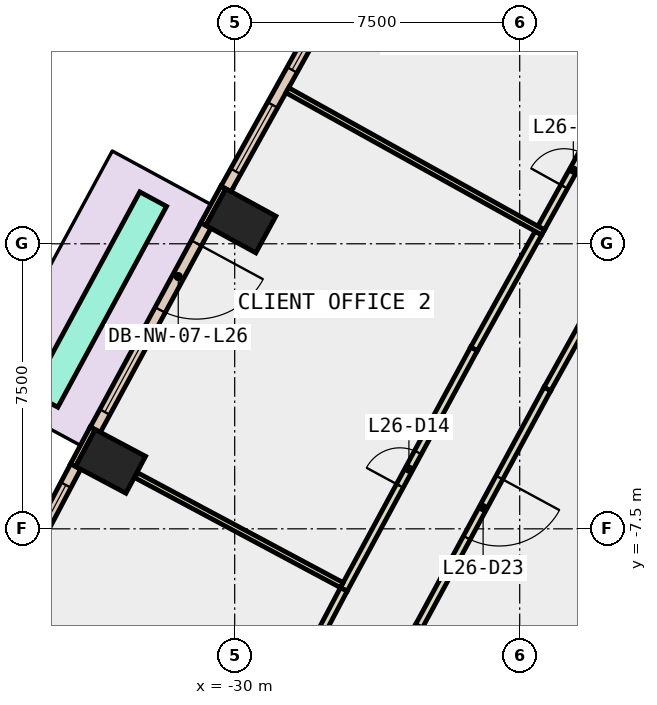
"""IFC4 building model, lengths in metres.
Left out: names, types, materials, properties, quantities, classifications, styles, units other than length and angle.
Written with IfcOpenShell. Run it as: python <this file> out.ifc"""

import sys

from ifc_helpers import new_model, si_unit, direction, frame, frame_2d, origin, origin_2d, place, context, subcontext, project, spatial, rectangle, extrude, element, fill, save


model = new_model("IFC4")
c1 = context("Model", 3, precision=1e-05, world=origin(), true_north=direction((0.0, 1.0)))
c2 = subcontext(c1, "Body", "Model", "MODEL_VIEW")
j1 = project(units=[si_unit("LENGTHUNIT", "METRE"), si_unit("PLANEANGLEUNIT", "RADIAN")], contexts=[c1])
p1 = place(None, origin())
s1 = spatial("IfcSite", under=j1, at=p1, CompositionType="ELEMENT")
p2 = place(p1, origin())
s2 = spatial("IfcBuilding", under=s1, at=p2, CompositionType="ELEMENT")
p3 = place(p2, frame((0.0, 0.0, 120.2)))
s3 = spatial("IfcBuildingStorey", under=s2, at=p3, CompositionType="ELEMENT", Elevation=120.2)
for number, where, z_axis, x_axis in (
    (1, (-29.838, 0.604, -0.4), (0.0, 0.0, 1.0), (0.48, 0.877, 0.0)),
    (2, (-33.266, -5.726, -0.4), (0.0, 0.0, 1.0), (0.469, 0.883, 0.0)),
):
    element("IfcColumn", number, at=place(p3, frame(where, z_axis=z_axis, x_axis=x_axis)), inside=s3, PredefinedType="COLUMN", context=c2, shape_type="SweptSolid", body=[
        extrude(rectangle(XDim=1.1, YDim=1.5, at=origin_2d()), origin(), (0.0, 0.0, 1.0), 4.2),
    ])
p4 = place(p3, frame((-30.298, 1.483, 0.0), z_axis=(0.0, 0.0, 1.0), x_axis=(-0.479566870346, -0.877505337229, 0.0)))
e3 = element("IfcWall", 3, at=p4, inside=s3, PredefinedType="STANDARD", context=c2, shape_type="SweptSolid", body=[
    extrude(rectangle(XDim=1.101, YDim=0.15, at=frame_2d((0.55, 0.0))), origin(), (0.0, 0.0, 1.0), 3.8),
])
p5 = place(p3, frame((-33.737, -4.854, 0.0), z_axis=(0.0, 0.0, 1.0), x_axis=(-0.46919310775, -0.883095593716, 0.0)))
e4 = element("IfcWall", 4, at=p5, inside=s3, PredefinedType="STANDARD", context=c2, shape_type="SweptSolid", body=[
    extrude(rectangle(XDim=1.099, YDim=0.15, at=frame_2d((0.55, 0.0))), origin(), (0.0, 0.0, 1.0), 3.8),
])
p6 = place(p3, frame((-27.262, 6.784, 0.0), z_axis=(0.0, 0.0, 1.0), x_axis=(-0.485822751649, -0.874057351654, 0.0)))
e5 = element("IfcWall", 5, at=p6, inside=s3, PredefinedType="STANDARD", context=c2, shape_type="SweptSolid", body=[
    extrude(rectangle(XDim=6.109, YDim=0.3, at=frame_2d((3.055, 0.0))), origin(), (0.0, 0.0, 1.0), 3.8),
])
p7 = place(p6, frame((0.527, 0.0, 0.9)))
e6 = element("IfcOpeningElement", 6, at=p7, cuts=e5, PredefinedType="OPENING", context=c2, shape_type="SweptSolid", body=[
    extrude(rectangle(XDim=2.0, YDim=2.6, at=frame_2d((1.0, 1.3))), frame((0.0, 0.16, 0.0), z_axis=(0.0, -1.0, 0.0), x_axis=(1.0, 0.0, 0.0)), (0.0, 0.0, 1.0), 0.32),
])
p8 = place(p6, frame((3.582, 0.0, 0.9)))
e7 = element("IfcOpeningElement", 7, at=p8, cuts=e5, PredefinedType="OPENING", context=c2, shape_type="SweptSolid", body=[
    extrude(rectangle(XDim=2.0, YDim=2.6, at=frame_2d((1.0, 1.3))), frame((0.0, 0.16, 0.0), z_axis=(0.0, -1.0, 0.0), x_axis=(1.0, 0.0, 0.0)), (0.0, 0.0, 1.0), 0.32),
])
p9 = place(p3, frame((-30.758, 0.481, 0.0), z_axis=(0.0, 0.0, 1.0), x_axis=(-0.476097776444, -0.879392351152, 0.0)))
e8 = element("IfcWall", 8, at=p9, inside=s3, PredefinedType="STANDARD", context=c2, shape_type="SweptSolid", body=[
    extrude(rectangle(XDim=6.11, YDim=0.3, at=frame_2d((3.055, 0.0))), origin(), (0.0, 0.0, 1.0), 3.8),
])
p10 = place(p9, frame((0.527, 0.0, 0.0)))
e9 = element("IfcOpeningElement", 9, at=p10, cuts=e8, PredefinedType="OPENING", context=c2, shape_type="SweptSolid", body=[
    extrude(rectangle(XDim=2.0, YDim=2.4, at=frame_2d((1.0, 1.2))), frame((0.0, 0.16, 0.0), z_axis=(0.0, -1.0, 0.0), x_axis=(1.0, 0.0, 0.0)), (0.0, 0.0, 1.0), 0.32),
])
p11 = place(p9, frame((3.582, 0.0, 0.9)))
e10 = element("IfcOpeningElement", 10, at=p11, cuts=e8, PredefinedType="OPENING", context=c2, shape_type="SweptSolid", body=[
    extrude(rectangle(XDim=2.0, YDim=2.6, at=frame_2d((1.0, 1.3))), frame((0.0, 0.16, 0.0), z_axis=(0.0, -1.0, 0.0), x_axis=(1.0, 0.0, 0.0)), (0.0, 0.0, 1.0), 0.32),
])
p12 = place(p3, frame((-34.185, -5.86, 0.0), z_axis=(0.0, 0.0, 1.0), x_axis=(-0.466599547852, -0.88446868907, 0.0)))
e11 = element("IfcWall", 11, at=p12, inside=s3, PredefinedType="STANDARD", context=c2, shape_type="SweptSolid", body=[
    extrude(rectangle(XDim=6.202, YDim=0.3, at=frame_2d((3.101, 0.0))), origin(), (0.0, 0.0, 1.0), 3.8),
])
p13 = place(p12, frame((0.551, 0.0, 0.9)))
e12 = element("IfcOpeningElement", 12, at=p13, cuts=e11, PredefinedType="OPENING", context=c2, shape_type="SweptSolid", body=[
    extrude(rectangle(XDim=2.0, YDim=2.6, at=frame_2d((1.0, 1.3))), frame((0.0, 0.16, 0.0), z_axis=(0.0, -1.0, 0.0), x_axis=(1.0, 0.0, 0.0)), (0.0, 0.0, 1.0), 0.32),
])
p14 = place(p12, frame((3.652, 0.0, 0.9)))
e13 = element("IfcOpeningElement", 13, at=p14, cuts=e11, PredefinedType="OPENING", context=c2, shape_type="SweptSolid", body=[
    extrude(rectangle(XDim=2.0, YDim=2.6, at=frame_2d((1.0, 1.3))), frame((0.0, 0.16, 0.0), z_axis=(0.0, -1.0, 0.0), x_axis=(1.0, 0.0, 0.0)), (0.0, 0.0, 1.0), 0.32),
])
p15 = place(p3, frame((-32.145, 1.175, 0.0), z_axis=(0.0, 0.0, 1.0), x_axis=(-0.476063277624, -0.879411027733, 0.0)))
e14 = element("IfcWall", 14, at=p15, inside=s3, PredefinedType="STANDARD", context=c2, shape_type="SweptSolid", body=[
    extrude(rectangle(XDim=6.01, YDim=0.8, at=frame_2d((3.005, 0.0))), origin(), (0.0, 0.0, 1.0), 0.8),
])
p16 = place(p3, frame((-18.324, 2.383, 0.0), z_axis=(0.0, 0.0, 1.0), x_axis=(-0.485826874234, -0.874055060206, 0.0)))
e15 = element("IfcWall", 15, at=p16, inside=s3, PredefinedType="PARTITIONING", context=c2, shape_type="SweptSolid", body=[
    extrude(rectangle(XDim=7.099, YDim=0.2, at=frame_2d((3.55, 0.0))), origin(), (0.0, 0.0, 1.0), 3.8),
])
p17 = place(p3, frame((-21.773, -3.822, 0.0), z_axis=(0.0, 0.0, 1.0), x_axis=(-0.476124717613, -0.87937776483, 0.0)))
e16 = element("IfcWall", 16, at=p17, inside=s3, PredefinedType="PARTITIONING", context=c2, shape_type="SweptSolid", body=[
    extrude(rectangle(XDim=7.099, YDim=0.2, at=frame_2d((3.55, 0.0))), origin(), (0.0, 0.0, 1.0), 3.8),
])
p18 = place(p17, frame((2.65, 0.0, 0.0)))
e17 = element("IfcOpeningElement", 17, at=p18, cuts=e16, PredefinedType="OPENING", context=c2, shape_type="SweptSolid", body=[
    extrude(rectangle(XDim=1.8, YDim=2.1, at=frame_2d((0.9, 1.05))), frame((0.0, 0.11, 0.0), z_axis=(0.0, -1.0, 0.0), x_axis=(1.0, 0.0, 0.0)), (0.0, 0.0, 1.0), 0.22),
])
p19 = place(p3, frame((-25.153, -10.065, 0.0), z_axis=(0.0, 0.0, 1.0), x_axis=(-0.466663976618, -0.884434696813, 0.0)))
e18 = element("IfcWall", 18, at=p19, inside=s3, PredefinedType="PARTITIONING", context=c2, shape_type="SweptSolid", body=[
    extrude(rectangle(XDim=6.501, YDim=0.2, at=frame_2d((3.25, 0.0))), origin(), (0.0, 0.0, 1.0), 3.8),
])
p20 = place(p3, frame((-21.936, 0.414, 0.0), z_axis=(0.0, 0.0, 1.0), x_axis=(0.485827202541, 0.874054877723, 0.0)))
e19 = element("IfcWall", 19, at=p20, inside=s3, PredefinedType="PARTITIONING", context=c2, shape_type="SweptSolid", body=[
    extrude(rectangle(XDim=3.487, YDim=0.2, at=frame_2d((1.744, 0.0))), origin(), (0.0, 0.0, 1.0), 3.8),
])
p21 = place(p20, frame((1.244, 0.0, 0.0)))
e20 = element("IfcOpeningElement", 20, at=p21, cuts=e19, PredefinedType="OPENING", context=c2, shape_type="SweptSolid", body=[
    extrude(rectangle(XDim=1.0, YDim=2.1, at=frame_2d((0.5, 1.05))), frame((0.0, 0.11, 0.0), z_axis=(0.0, -1.0, 0.0), x_axis=(1.0, 0.0, 0.0)), (0.0, 0.0, 1.0), 0.22),
])
p22 = place(p3, frame((-27.129, -9.094, 0.0), z_axis=(0.0, 0.0, 1.0), x_axis=(0.476090835435, 0.879396108938, 0.0)))
e21 = element("IfcWall", 21, at=p22, inside=s3, PredefinedType="PARTITIONING", context=c2, shape_type="SweptSolid", body=[
    extrude(rectangle(XDim=7.198, YDim=0.2, at=frame_2d((3.599, 0.0))), origin(), (0.0, 0.0, 1.0), 3.8),
])
p23 = place(p22, frame((3.099, 0.0, 0.0)))
e22 = element("IfcOpeningElement", 22, at=p23, cuts=e21, PredefinedType="OPENING", context=c2, shape_type="SweptSolid", body=[
    extrude(rectangle(XDim=1.0, YDim=2.1, at=frame_2d((0.5, 1.05))), frame((0.0, 0.11, 0.0), z_axis=(0.0, -1.0, 0.0), x_axis=(1.0, 0.0, 0.0)), (0.0, 0.0, 1.0), 0.22),
])
p24 = place(p3, frame((-23.702, -2.764, 0.0), z_axis=(0.0, 0.0, 1.0), x_axis=(0.485892653581, 0.874018494767, 0.0)))
e23 = element("IfcWall", 23, at=p24, inside=s3, PredefinedType="PARTITIONING", context=c2, shape_type="SweptSolid", body=[
    extrude(rectangle(XDim=3.486, YDim=0.2, at=frame_2d((1.743, 0.0))), origin(), (0.0, 0.0, 1.0), 3.8),
])
p25 = place(p3, frame((-30.221, -14.956, 0.0), z_axis=(0.0, 0.0, 1.0), x_axis=(0.466543318111, 0.884498350663, 0.0)))
e24 = element("IfcWall", 24, at=p25, inside=s3, PredefinedType="PARTITIONING", context=c2, shape_type="SweptSolid", body=[
    extrude(rectangle(XDim=6.627, YDim=0.2, at=frame_2d((3.314, 0.0))), origin(), (0.0, 0.0, 1.0), 3.8),
])
p26 = place(p25, frame((2.889, 0.0, 0.0)))
e25 = element("IfcOpeningElement", 25, at=p26, cuts=e24, PredefinedType="OPENING", context=c2, shape_type="SweptSolid", body=[
    extrude(rectangle(XDim=1.0, YDim=2.1, at=frame_2d((0.5, 1.05))), frame((0.0, 0.11, 0.0), z_axis=(0.0, -1.0, 0.0), x_axis=(1.0, 0.0, 0.0)), (0.0, 0.0, 1.0), 0.22),
])
p27 = place(p3, frame((-21.885, 0.3, 0.0), z_axis=(0.0, 0.0, 1.0), x_axis=(-0.874095944746, 0.485753311237, 0.0)))
e26 = element("IfcWall", 26, at=p27, inside=s3, PredefinedType="PARTITIONING", context=c2, shape_type="SweptSolid", body=[
    extrude(rectangle(XDim=7.699, YDim=0.15, at=frame_2d((3.85, 0.0))), origin(), (0.0, 0.0, 1.0), 3.8),
])
p28 = place(p3, frame((-27.182, -8.981, 0.0), z_axis=(0.0, 0.0, 1.0), x_axis=(-0.881899408669, 0.471437623647, 0.0)))
e27 = element("IfcWall", 27, at=p28, inside=s3, PredefinedType="PARTITIONING", context=c2, shape_type="SweptSolid", body=[
    extrude(rectangle(XDim=6.13, YDim=0.15, at=frame_2d((3.065, 0.0))), origin(), (0.0, 0.0, 1.0), 3.8),
])
p29 = place(p7, origin())
e28 = element("IfcWindow", 28, at=p29, inside=s3, PartitioningType="SINGLE_PANEL", PredefinedType="WINDOW", context=c2, shape_type="SweptSolid", body=[
    extrude(rectangle(XDim=2.0, YDim=2.6, at=frame_2d((1.0, 1.3))), frame((0.0, 0.03, 0.0), z_axis=(0.0, -1.0, 0.0), x_axis=(1.0, 0.0, 0.0)), (0.0, 0.0, 1.0), 0.06),
])
fill(e6, e28)
p30 = place(p8, origin())
e29 = element("IfcWindow", 29, at=p30, inside=s3, PartitioningType="SINGLE_PANEL", PredefinedType="WINDOW", context=c2, shape_type="SweptSolid", body=[
    extrude(rectangle(XDim=2.0, YDim=2.6, at=frame_2d((1.0, 1.3))), frame((0.0, 0.03, 0.0), z_axis=(0.0, -1.0, 0.0), x_axis=(1.0, 0.0, 0.0)), (0.0, 0.0, 1.0), 0.06),
])
fill(e7, e29)
p31 = place(p10, origin())
e30 = element("IfcDoor", 30, at=p31, inside=s3, OperationType="SLIDING_TO_LEFT", PredefinedType="DOOR", context=c2, shape_type="SweptSolid", body=[
    extrude(rectangle(XDim=2.0, YDim=2.4, at=frame_2d((1.0, 1.2))), frame((0.0, 0.025, 0.0), z_axis=(0.0, -1.0, 0.0), x_axis=(1.0, 0.0, 0.0)), (0.0, 0.0, 1.0), 0.05),
])
fill(e9, e30)
p32 = place(p11, origin())
e31 = element("IfcWindow", 31, at=p32, inside=s3, PartitioningType="SINGLE_PANEL", PredefinedType="WINDOW", context=c2, shape_type="SweptSolid", body=[
    extrude(rectangle(XDim=2.0, YDim=2.6, at=frame_2d((1.0, 1.3))), frame((0.0, 0.03, 0.0), z_axis=(0.0, -1.0, 0.0), x_axis=(1.0, 0.0, 0.0)), (0.0, 0.0, 1.0), 0.06),
])
fill(e10, e31)
p33 = place(p13, origin())
e32 = element("IfcWindow", 32, at=p33, inside=s3, PartitioningType="SINGLE_PANEL", PredefinedType="WINDOW", context=c2, shape_type="SweptSolid", body=[
    extrude(rectangle(XDim=2.0, YDim=2.6, at=frame_2d((1.0, 1.3))), frame((0.0, 0.03, 0.0), z_axis=(0.0, -1.0, 0.0), x_axis=(1.0, 0.0, 0.0)), (0.0, 0.0, 1.0), 0.06),
])
fill(e12, e32)
p34 = place(p21, origin())
e33 = element("IfcDoor", 33, at=p34, inside=s3, OperationType="SINGLE_SWING_RIGHT", PredefinedType="DOOR", context=c2, shape_type="SweptSolid", body=[
    extrude(rectangle(XDim=1.0, YDim=2.1, at=frame_2d((0.5, 1.05))), frame((0.0, 0.025, 0.0), z_axis=(0.0, -1.0, 0.0), x_axis=(1.0, 0.0, 0.0)), (0.0, 0.0, 1.0), 0.05),
])
fill(e20, e33)
p35 = place(p23, origin())
e34 = element("IfcDoor", 34, at=p35, inside=s3, OperationType="SINGLE_SWING_RIGHT", PredefinedType="DOOR", context=c2, shape_type="SweptSolid", body=[
    extrude(rectangle(XDim=1.0, YDim=2.1, at=frame_2d((0.5, 1.05))), frame((0.0, 0.025, 0.0), z_axis=(0.0, -1.0, 0.0), x_axis=(1.0, 0.0, 0.0)), (0.0, 0.0, 1.0), 0.05),
])
fill(e22, e34)
p36 = place(p18, origin())
e35 = element("IfcDoor", 35, at=p36, inside=s3, OperationType="DOUBLE_DOOR_SINGLE_SWING", PredefinedType="DOOR", context=c2, shape_type="SweptSolid", body=[
    extrude(rectangle(XDim=1.8, YDim=2.1, at=frame_2d((0.9, 1.05))), frame((0.0, 0.025, 0.0), z_axis=(0.0, -1.0, 0.0), x_axis=(1.0, 0.0, 0.0)), (0.0, 0.0, 1.0), 0.05),
])
fill(e17, e35)
save(model, sys.argv[1])
